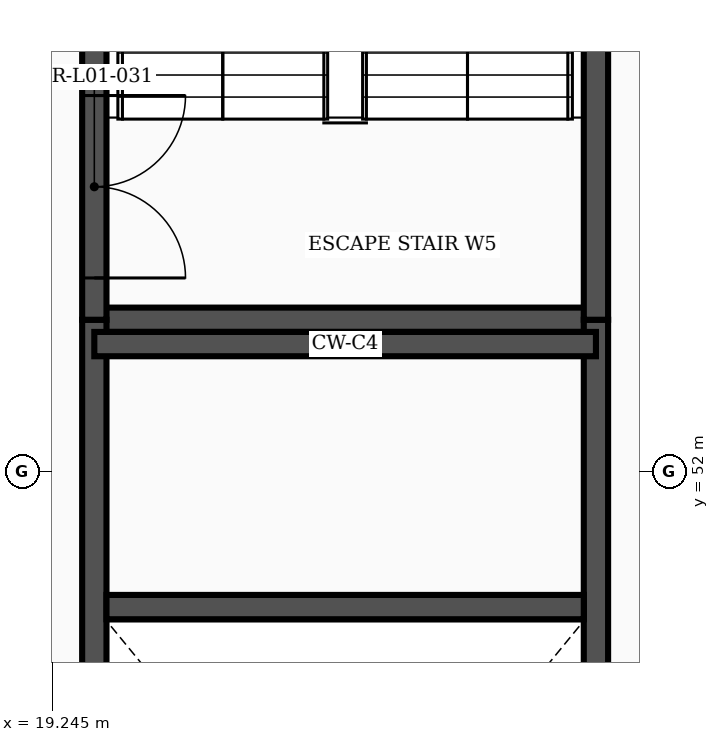
"""IFC4 building model, lengths in metres.
Left out: names, types, materials, properties, quantities, classifications, styles, units other than length and angle.
Written with IfcOpenShell. Run it as: python <this file> out.ifc"""

import sys

from ifc_helpers import new_model, si_unit, direction, frame, frame_2d, origin, place, context, subcontext, project, spatial, rectangle, extrude, element, fill, save


model = new_model("IFC4")
c1 = context("Model", 3, precision=1e-05, world=origin(), true_north=direction((0.0, 1.0)))
c2 = subcontext(c1, "Body", "Model", "MODEL_VIEW")
j1 = project(units=[si_unit("LENGTHUNIT", "METRE"), si_unit("PLANEANGLEUNIT", "RADIAN")], contexts=[c1])
p1 = place(None, origin())
s1 = spatial("IfcSite", under=j1, at=p1, CompositionType="ELEMENT")
p2 = place(p1, origin())
s2 = spatial("IfcBuilding", under=s1, at=p2, CompositionType="ELEMENT")
p3 = place(p2, frame((0.0, 0.0, 6.0)))
s3 = spatial("IfcBuildingStorey", under=s2, at=p3, CompositionType="ELEMENT", Elevation=6.0)
p4 = place(p3, frame((19.8, 54.0, 0.0), z_axis=(0.0, 0.0, 1.0), x_axis=(1.0, 0.0, 0.0)))
e1 = element("IfcWall", 1, at=p4, inside=s3, PredefinedType="SHEAR", context=c2, shape_type="SweptSolid", body=[
    extrude(rectangle(XDim=6.6, YDim=0.32, at=frame_2d((3.3, 0.0))), origin(), (0.0, 0.0, 1.0), 5.15),
])
p5 = place(p3, frame((19.8, 39.4, 0.0), z_axis=(0.0, 0.0, 1.0), x_axis=(0.0, 1.0, 0.0)))
e2 = element("IfcWall", 2, at=p5, inside=s3, PredefinedType="SHEAR", context=c2, shape_type="SweptSolid", body=[
    extrude(rectangle(XDim=14.6, YDim=0.32, at=frame_2d((7.3, 0.0))), origin(), (0.0, 0.0, 1.0), 5.15),
])
p6 = place(p5, frame((0.55, 0.0, 0.0)))
e3 = element("IfcOpeningElement", 3, at=p6, cuts=e2, PredefinedType="OPENING", context=c2, shape_type="SweptSolid", body=[
    extrude(rectangle(XDim=2.4, YDim=2.25, at=frame_2d((1.2, 1.125))), frame((0.0, 0.172, 0.0), z_axis=(0.0, -1.0, 0.0), x_axis=(1.0, 0.0, 0.0)), (0.0, 0.0, 1.0), 0.344),
])
p7 = place(p3, frame((26.4, 39.4, 0.0), z_axis=(0.0, 0.0, 1.0), x_axis=(0.0, 1.0, 0.0)))
e4 = element("IfcWall", 4, at=p7, inside=s3, PredefinedType="SHEAR", context=c2, shape_type="SweptSolid", body=[
    extrude(rectangle(XDim=14.6, YDim=0.32, at=frame_2d((7.3, 0.0))), origin(), (0.0, 0.0, 1.0), 5.15),
])
p8 = place(p3, frame((19.96, 50.22, 0.0), z_axis=(0.0, 0.0, 1.0), x_axis=(1.0, 0.0, 0.0)))
e5 = element("IfcWall", 5, at=p8, inside=s3, PredefinedType="SHEAR", context=c2, shape_type="SweptSolid", body=[
    extrude(rectangle(XDim=6.28, YDim=0.32, at=frame_2d((3.14, 0.0))), origin(), (0.0, 0.0, 1.0), 5.15),
])
p9 = place(p3, frame((19.8, 53.68, 0.0), z_axis=(0.0, 0.0, 1.0), x_axis=(1.0, 0.0, 0.0)))
e6 = element("IfcWall", 6, at=p9, inside=s3, PredefinedType="SHEAR", context=c2, shape_type="SweptSolid", body=[
    extrude(rectangle(XDim=6.6, YDim=0.32, at=frame_2d((3.3, 0.0))), origin(), (0.0, 0.0, 1.0), 5.15),
])
p10 = place(p3, frame((19.8, 54.0, 0.0), z_axis=(0.0, 0.0, 1.0), x_axis=(0.0, 1.0, 0.0)))
e7 = element("IfcWall", 7, at=p10, inside=s3, PredefinedType="SHEAR", context=c2, shape_type="SweptSolid", body=[
    extrude(rectangle(XDim=12.0, YDim=0.32, at=frame_2d((6.0, 0.0))), origin(), (0.0, 0.0, 1.0), 5.15),
])
p11 = place(p10, frame((0.55, 0.0, 0.0)))
e8 = element("IfcOpeningElement", 8, at=p11, cuts=e7, PredefinedType="OPENING", context=c2, shape_type="SweptSolid", body=[
    extrude(rectangle(XDim=2.4, YDim=2.25, at=frame_2d((1.2, 1.125))), frame((0.0, 0.172, 0.0), z_axis=(0.0, -1.0, 0.0), x_axis=(1.0, 0.0, 0.0)), (0.0, 0.0, 1.0), 0.344),
])
p12 = place(p3, frame((26.4, 54.0, 0.0), z_axis=(0.0, 0.0, 1.0), x_axis=(0.0, 1.0, 0.0)))
e9 = element("IfcWall", 9, at=p12, inside=s3, PredefinedType="SHEAR", context=c2, shape_type="SweptSolid", body=[
    extrude(rectangle(XDim=12.0, YDim=0.32, at=frame_2d((6.0, 0.0))), origin(), (0.0, 0.0, 1.0), 5.15),
])
p13 = place(p11, frame((2.4, 0.0, 0.0), z_axis=(0.0, 0.0, 1.0), x_axis=(-1.0, 0.0, 0.0)))
e10 = element("IfcDoor", 10, at=p13, inside=s3, OperationType="DOUBLE_DOOR_SINGLE_SWING", PredefinedType="DOOR", context=c2, shape_type="SweptSolid", body=[
    extrude(rectangle(XDim=2.4, YDim=2.25, at=frame_2d((1.2, 1.125))), frame((0.0, 0.025, 0.0), z_axis=(0.0, -1.0, 0.0), x_axis=(1.0, 0.0, 0.0)), (0.0, 0.0, 1.0), 0.05),
])
fill(e8, e10)
save(model, sys.argv[1])
